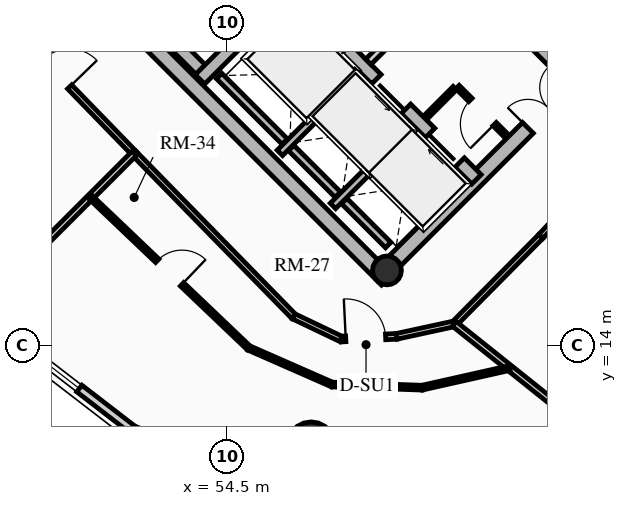
"""IFC4 building model, lengths in metres.
Left out: names, types, materials, properties, quantities, classifications, styles, units other than length and angle.
Written with IfcOpenShell. Run it as: python <this file> out.ifc"""

import sys

from ifc_helpers import new_model, si_unit, direction, frame, frame_2d, origin, origin_2d, place, context, subcontext, project, spatial, rectangle, circle, hollow_circle, extrude, source, transform, mapped, element, fill, save


model = new_model("IFC4")
c1 = context("Model", 3, precision=1e-05, world=origin(), true_north=direction((0.0, 1.0)))
c2 = subcontext(c1, "Body", "Model", "MODEL_VIEW")
j1 = project(units=[si_unit("LENGTHUNIT", "METRE"), si_unit("PLANEANGLEUNIT", "RADIAN")], contexts=[c1])
p1 = place(None, origin())
s1 = spatial("IfcSite", under=j1, at=p1, CompositionType="ELEMENT")
p2 = place(p1, origin())
s2 = spatial("IfcBuilding", under=s1, at=p2, CompositionType="ELEMENT")
p3 = place(p2, frame((0.0, 0.0, 174.88)))
s3 = spatial("IfcBuildingStorey", under=s2, at=p3, CompositionType="ELEMENT", Elevation=174.88)
p4 = place(p3, frame((58.702, 15.732, 0.0), z_axis=(0.0, 0.0, 1.0), x_axis=(-0.707106781187, 0.707106781187, 0.0)))
e1 = element("IfcWall", 1, at=p4, inside=s3, PredefinedType="SHEAR", context=c2, shape_type="SweptSolid", body=[
    extrude(rectangle(XDim=14.1, YDim=0.4, at=frame_2d((7.05, 0.0))), origin(), (0.0, 0.0, 1.0), 2.91),
])
p5 = place(p3, frame((58.561, 15.873, 0.0), z_axis=(0.0, 0.0, 1.0), x_axis=(0.707106781187, 0.707106781187, 0.0)))
e2 = element("IfcWall", 2, at=p5, inside=s3, PredefinedType="SHEAR", context=c2, shape_type="SweptSolid", body=[
    extrude(rectangle(XDim=10.7, YDim=0.4, at=frame_2d((5.35, 0.0))), origin(), (0.0, 0.0, 1.0), 2.91),
])
m1 = source(origin(), c2, "Body", "SweptSolid", [
    extrude(rectangle(XDim=1.5, YDim=2.02, at=frame_2d((0.75, 1.01))), frame((0.0, 0.21, 0.0), z_axis=(0.0, -1.0, 0.0), x_axis=(1.0, 0.0, 0.0)), (0.0, 0.0, 1.0), 0.42),
])
p6 = place(p5, frame((5.45, 0.0, 0.0)))
e3 = element("IfcOpeningElement", 3, at=p6, cuts=e2, PredefinedType="OPENING", context=c2, shape_type="MappedRepresentation", body=[
    mapped(m1, transform((0.0, 0.0, 0.0), x_axis=(1.0, 0.0, 0.0), y_axis=(0.0, 1.0, 0.0), z_axis=(0.0, 0.0, 1.0), scale=1.0)),
])
p7 = place(p3, frame((61.06, 18.373, 0.0), z_axis=(0.0, 0.0, 1.0), x_axis=(-0.707106781187, 0.707106781187, 0.0)))
e4 = element("IfcWall", 4, at=p7, inside=s3, PredefinedType="SHEAR", context=c2, shape_type="SweptSolid", body=[
    extrude(rectangle(XDim=13.7, YDim=0.35, at=frame_2d((6.85, 0.0))), origin(), (0.0, 0.0, 1.0), 2.91),
])
m2 = source(origin(), c2, "Body", "SweptSolid", [
    extrude(rectangle(XDim=1.1, YDim=2.015, at=frame_2d((0.55, 1.007))), frame((0.0, 0.185, 0.0), z_axis=(0.0, -1.0, 0.0), x_axis=(1.0, 0.0, 0.0)), (0.0, 0.0, 1.0), 0.37),
])
p8 = place(p7, frame((4.85, 0.0, 0.0)))
e5 = element("IfcOpeningElement", 5, at=p8, cuts=e4, PredefinedType="OPENING", context=c2, shape_type="MappedRepresentation", body=[
    mapped(m2, transform((0.0, 0.0, 0.0), x_axis=(1.0, 0.0, 0.0), y_axis=(0.0, 1.0, 0.0), z_axis=(0.0, 0.0, 1.0), scale=1.0)),
])
p9 = place(p7, frame((0.625, 0.0, 0.0)))
e6 = element("IfcOpeningElement", 6, at=p9, cuts=e4, PredefinedType="OPENING", context=c2, shape_type="MappedRepresentation", body=[
    mapped(m2, transform((0.0, 0.0, 0.0), x_axis=(1.0, 0.0, 0.0), y_axis=(0.0, 1.0, 0.0), z_axis=(0.0, 0.0, 1.0), scale=1.0)),
])
p10 = place(p7, frame((2.625, 0.0, 0.0)))
e7 = element("IfcOpeningElement", 7, at=p10, cuts=e4, PredefinedType="OPENING", context=c2, shape_type="MappedRepresentation", body=[
    mapped(m2, transform((0.0, 0.0, 0.0), x_axis=(1.0, 0.0, 0.0), y_axis=(0.0, 1.0, 0.0), z_axis=(0.0, 0.0, 1.0), scale=1.0)),
])
m3 = source(origin(), c2, "Body", "SweptSolid", [
    extrude(rectangle(XDim=1.15, YDim=2.02, at=frame_2d((0.575, 1.01))), frame((0.0, 0.185, 0.0), z_axis=(0.0, -1.0, 0.0), x_axis=(1.0, 0.0, 0.0)), (0.0, 0.0, 1.0), 0.37),
])
p11 = place(p7, frame((7.27, 0.0, 0.0)))
e8 = element("IfcOpeningElement", 8, at=p11, cuts=e4, PredefinedType="OPENING", context=c2, shape_type="MappedRepresentation", body=[
    mapped(m3, transform((0.0, 0.0, 0.0), x_axis=(1.0, 0.0, 0.0), y_axis=(0.0, 1.0, 0.0), z_axis=(0.0, 0.0, 1.0), scale=1.0)),
])
p12 = place(p3, frame((63.627, 20.94, 0.0), z_axis=(0.0, 0.0, 1.0), x_axis=(-0.707119496762, 0.707094065383, 0.0)))
e9 = element("IfcWall", 9, at=p12, inside=s3, PredefinedType="SHEAR", context=c2, shape_type="SweptSolid", body=[
    extrude(rectangle(XDim=9.6, YDim=0.35, at=frame_2d((4.8, 0.0))), origin(), (0.0, 0.0, 1.0), 2.91),
])
p13 = place(p12, frame((5.28, 0.0, 0.0)))
e10 = element("IfcOpeningElement", 10, at=p13, cuts=e9, PredefinedType="OPENING", context=c2, shape_type="MappedRepresentation", body=[
    mapped(m3, transform((0.0, 0.0, 0.0), x_axis=(1.0, 0.0, 0.0), y_axis=(0.0, 1.0, 0.0), z_axis=(0.0, 0.0, 1.0), scale=1.0)),
])
p14 = place(p3, frame((53.922, 21.141, 0.0), z_axis=(0.0, 0.0, 1.0), x_axis=(-0.707106781187, 0.707106781187, 0.0)))
e11 = element("IfcWall", 11, at=p14, inside=s3, PredefinedType="SHEAR", context=c2, shape_type="SweptSolid", body=[
    extrude(rectangle(XDim=6.695, YDim=0.35, at=frame_2d((3.348, 0.0))), origin(), (0.0, 0.0, 1.0), 2.91),
])
p15 = place(p3, frame((53.784, 21.003, 0.0), z_axis=(0.0, 0.0, 1.0), x_axis=(0.707106781187, 0.707106781187, 0.0)))
e12 = element("IfcWall", 12, at=p15, inside=s3, PredefinedType="SHEAR", context=c2, shape_type="SweptSolid", body=[
    extrude(rectangle(XDim=3.285, YDim=0.35, at=frame_2d((1.643, 0.0))), origin(), (0.0, 0.0, 1.0), 2.91),
])
p16 = place(p3, frame((58.706, 15.976, 0.0), z_axis=(0.0, 0.0, 1.0), x_axis=(0.707106781187, 0.707106781187, 0.0)))
e13 = element("IfcColumn", 13, at=p16, inside=s3, PredefinedType="COLUMN", context=c2, shape_type="SweptSolid", body=[
    extrude(hollow_circle(Radius=0.38, WallThickness=0.032, at=origin_2d()), origin(), (0.0, 0.0, 1.0), 2.91),
])
p17 = place(p3, frame((56.709, 11.365, 0.0), z_axis=(0.0, 0.0, 1.0), x_axis=(1.0, 0.0, 0.0)))
e14 = element("IfcColumn", 14, at=p17, inside=s3, PredefinedType="USERDEFINED", context=c2, shape_type="SweptSolid", body=[
    extrude(circle(Radius=0.625, at=origin_2d()), origin(), (0.0, 0.0, 1.0), 2.91),
])
p18 = place(p3, frame((52.021, 11.78, 0.0), z_axis=(0.0, 0.0, 1.0), x_axis=(-0.791962560189, 0.610569654715, 0.0)))
e15 = element("IfcWall", 15, at=p18, inside=s3, PredefinedType="SOLIDWALL", context=c2, shape_type="SweptSolid", body=[
    extrude(rectangle(XDim=5.163, YDim=0.22, at=frame_2d((2.582, 0.0))), origin(), (0.0, 0.0, 1.0), 2.245),
])
m4 = source(origin(), c2, "Body", "SweptSolid", [
    extrude(rectangle(XDim=1.6, YDim=1.3, at=frame_2d((0.8, 0.65))), frame((0.0, 0.12, 0.0), z_axis=(0.0, -1.0, 0.0), x_axis=(1.0, 0.0, 0.0)), (0.0, 0.0, 1.0), 0.24),
])
p19 = place(p18, frame((1.782, 0.0, 0.65)))
e16 = element("IfcOpeningElement", 16, at=p19, cuts=e15, PredefinedType="OPENING", context=c2, shape_type="MappedRepresentation", body=[
    mapped(m4, transform((0.0, 0.0, 0.0), x_axis=(1.0, 0.0, 0.0), y_axis=(0.0, 1.0, 0.0), z_axis=(0.0, 0.0, 1.0), scale=1.0)),
])
p20 = place(p3, frame((55.888, 19.069, 0.0), z_axis=(0.0, 0.0, 1.0), x_axis=(0.707106781187, 0.707106781187, 0.0)))
e17 = element("IfcWall", 17, at=p20, inside=s3, PredefinedType="SHEAR", context=c2, shape_type="SweptSolid", body=[
    extrude(rectangle(XDim=2.97, YDim=0.2, at=frame_2d((1.485, 0.0))), origin(), (0.0, 0.0, 1.0), 2.91),
])
p21 = place(p3, frame((56.015, 19.366, 0.0), z_axis=(0.0, 0.0, 1.0), x_axis=(-0.707106781187, 0.707106781187, 0.0)))
e18 = element("IfcWall", 18, at=p21, inside=s3, PredefinedType="SHEAR", context=c2, shape_type="SweptSolid", body=[
    extrude(rectangle(XDim=2.44, YDim=0.2, at=frame_2d((1.22, 0.0))), origin(), (0.0, 0.0, 1.0), 2.91),
])
p22 = place(p3, frame((57.284, 17.673, 0.0), z_axis=(0.0, 0.0, 1.0), x_axis=(0.707147878904, 0.70706568108, 0.0)))
e19 = element("IfcWall", 19, at=p22, inside=s3, PredefinedType="SHEAR", context=c2, shape_type="SweptSolid", body=[
    extrude(rectangle(XDim=2.97, YDim=0.2, at=frame_2d((1.485, 0.0))), origin(), (0.0, 0.0, 1.0), 2.91),
])
p23 = place(p3, frame((57.412, 17.97, 0.0), z_axis=(0.0, 0.0, 1.0), x_axis=(-0.707106781187, 0.707106781187, 0.0)))
e20 = element("IfcWall", 20, at=p23, inside=s3, PredefinedType="SHEAR", context=c2, shape_type="SweptSolid", body=[
    extrude(rectangle(XDim=1.735, YDim=0.2, at=frame_2d((0.867, 0.0))), origin(), (0.0, 0.0, 1.0), 2.91),
])
p24 = place(p3, frame((58.737, 16.644, 0.0), z_axis=(0.0, 0.0, 1.0), x_axis=(-0.707032117043, 0.707181437447, 0.0)))
e21 = element("IfcWall", 21, at=p24, inside=s3, PredefinedType="SHEAR", context=c2, shape_type="SweptSolid", body=[
    extrude(rectangle(XDim=1.635, YDim=0.2, at=frame_2d((0.817, 0.0))), origin(), (0.0, 0.0, 1.0), 2.91),
])
p25 = place(p3, frame((58.214, 21.467, 0.0), z_axis=(0.0, 0.0, 1.0), x_axis=(0.707106781187, 0.707106781187, 0.0)))
e22 = element("IfcWall", 22, at=p25, inside=s3, PredefinedType="PARTITIONING", context=c2, shape_type="SweptSolid", body=[
    extrude(rectangle(XDim=3.28, YDim=0.2, at=frame_2d((1.64, 0.0))), origin(), (0.0, 0.0, 1.0), 2.675),
])
m5 = source(origin(), c2, "Body", "SweptSolid", [
    extrude(rectangle(XDim=1.5, YDim=2.02, at=frame_2d((0.75, 1.01))), frame((0.0, 0.11, 0.0), z_axis=(0.0, -1.0, 0.0), x_axis=(1.0, 0.0, 0.0)), (0.0, 0.0, 1.0), 0.22),
])
p26 = place(p25, frame((1.55, 0.0, 0.0)))
e23 = element("IfcOpeningElement", 23, at=p26, cuts=e22, PredefinedType="OPENING", context=c2, shape_type="MappedRepresentation", body=[
    mapped(m5, transform((0.0, 0.0, 0.0), x_axis=(1.0, 0.0, 0.0), y_axis=(0.0, 1.0, 0.0), z_axis=(0.0, 0.0, 1.0), scale=1.0)),
])
p27 = place(p3, frame((61.835, 19.529, 0.0), z_axis=(0.0, 0.0, 1.0), x_axis=(-0.707174592913, 0.707038962956, 0.0)))
e24 = element("IfcWall", 24, at=p27, inside=s3, PredefinedType="PARTITIONING", context=c2, shape_type="SweptSolid", body=[
    extrude(rectangle(XDim=1.8, YDim=0.125, at=frame_2d((0.9, 0.0))), origin(), (0.0, 0.0, 1.0), 2.675),
])
m6 = source(origin(), c2, "Body", "SweptSolid", [
    extrude(rectangle(XDim=0.9, YDim=2.005, at=frame_2d((0.45, 1.002))), frame((0.0, 0.073, 0.0), z_axis=(0.0, -1.0, 0.0), x_axis=(1.0, 0.0, 0.0)), (0.0, 0.0, 1.0), 0.145),
])
p28 = place(p27, frame((0.42, 0.0, 0.0)))
e25 = element("IfcOpeningElement", 25, at=p28, cuts=e24, PredefinedType="OPENING", context=c2, shape_type="MappedRepresentation", body=[
    mapped(m6, transform((0.0, 0.0, 0.0), x_axis=(1.0, 0.0, 0.0), y_axis=(0.0, 1.0, 0.0), z_axis=(0.0, 0.0, 1.0), scale=1.0)),
])
p29 = place(p3, frame((59.713, 19.996, 0.0), z_axis=(0.0, 0.0, 1.0), x_axis=(0.707217726, 0.706995818963, 0.0)))
e26 = element("IfcWall", 26, at=p29, inside=s3, PredefinedType="PARTITIONING", context=c2, shape_type="SweptSolid", body=[
    extrude(rectangle(XDim=1.1, YDim=0.125, at=frame_2d((0.55, 0.0))), origin(), (0.0, 0.0, 1.0), 2.675),
])
p30 = place(p3, frame((47.959, 23.277, 0.0), z_axis=(0.0, 0.0, 1.0), x_axis=(0.696422573496, -0.717631938479, 0.0)))
e27 = element("IfcWall", 27, at=p30, inside=s3, PredefinedType="PARTITIONING", context=c2, shape_type="SweptSolid", body=[
    extrude(rectangle(XDim=5.882, YDim=0.15, at=frame_2d((2.941, 0.0))), origin(), (0.0, 0.0, 1.0), 2.675),
])
m7 = source(origin(), c2, "Body", "SweptSolid", [
    extrude(rectangle(XDim=1.0, YDim=2.015, at=frame_2d((0.5, 1.007))), frame((0.0, 0.085, 0.0), z_axis=(0.0, -1.0, 0.0), x_axis=(1.0, 0.0, 0.0)), (0.0, 0.0, 1.0), 0.17),
])
p31 = place(p30, frame((2.441, 0.0, 0.0)))
e28 = element("IfcOpeningElement", 28, at=p31, cuts=e27, PredefinedType="OPENING", context=c2, shape_type="MappedRepresentation", body=[
    mapped(m7, transform((0.0, 0.0, 0.0), x_axis=(1.0, 0.0, 0.0), y_axis=(0.0, 1.0, 0.0), z_axis=(0.0, 0.0, 1.0), scale=1.0)),
])
p32 = place(p3, frame((52.055, 19.055, 0.0), z_axis=(0.0, 0.0, 1.0), x_axis=(0.699249850691, -0.714877364524, 0.0)))
e29 = element("IfcWall", 29, at=p32, inside=s3, PredefinedType="PARTITIONING", context=c2, shape_type="SweptSolid", body=[
    extrude(rectangle(XDim=5.999, YDim=0.15, at=frame_2d((3.0, 0.0))), origin(), (0.0, 0.0, 1.0), 2.245),
])
p33 = place(p3, frame((56.25, 14.767, 0.0), z_axis=(0.0, 0.0, 1.0), x_axis=(0.902518380752, -0.430651335078, 0.0)))
e30 = element("IfcWall", 30, at=p33, inside=s3, PredefinedType="PARTITIONING", context=c2, shape_type="SweptSolid", body=[
    extrude(rectangle(XDim=1.386, YDim=0.15, at=frame_2d((0.693, 0.0))), origin(), (0.0, 0.0, 1.0), 2.245),
])
p34 = place(p3, frame((57.501, 14.17, 0.0), z_axis=(0.0, 0.0, 1.0), x_axis=(0.998814137693, 0.048685915254, 0.0)))
e31 = element("IfcWall", 31, at=p34, inside=s3, PredefinedType="PARTITIONING", context=c2, shape_type="SweptSolid", body=[
    extrude(rectangle(XDim=1.459, YDim=0.15, at=frame_2d((0.729, 0.0))), origin(), (0.0, 0.0, 1.0), 2.245),
])
m8 = source(origin(), c2, "Body", "SweptSolid", [
    extrude(rectangle(XDim=1.05, YDim=2.015, at=frame_2d((0.525, 1.007))), frame((0.0, 0.085, 0.0), z_axis=(0.0, -1.0, 0.0), x_axis=(1.0, 0.0, 0.0)), (0.0, 0.0, 1.0), 0.17),
])
p35 = place(p34, frame((0.12, 0.0, 0.0)))
e32 = element("IfcOpeningElement", 32, at=p35, cuts=e31, PredefinedType="OPENING", context=c2, shape_type="MappedRepresentation", body=[
    mapped(m8, transform((0.0, 0.0, 0.0), x_axis=(1.0, 0.0, 0.0), y_axis=(0.0, 1.0, 0.0), z_axis=(0.0, 0.0, 1.0), scale=1.0)),
])
p36 = place(p3, frame((58.959, 14.241, 0.0), z_axis=(0.0, 0.0, 1.0), x_axis=(0.977216106897, 0.212246744196, 0.0)))
e33 = element("IfcWall", 33, at=p36, inside=s3, PredefinedType="PARTITIONING", context=c2, shape_type="SweptSolid", body=[
    extrude(rectangle(XDim=1.552, YDim=0.15, at=frame_2d((0.776, 0.0))), origin(), (0.0, 0.0, 1.0), 2.245),
])
p37 = place(p3, frame((60.475, 14.57, 0.0), z_axis=(0.0, 0.0, 1.0), x_axis=(0.703709284374, 0.710488031628, 0.0)))
e34 = element("IfcWall", 34, at=p37, inside=s3, PredefinedType="PARTITIONING", context=c2, shape_type="SweptSolid", body=[
    extrude(rectangle(XDim=3.241, YDim=0.15, at=frame_2d((1.621, 0.0))), origin(), (0.0, 0.0, 1.0), 2.245),
])
p38 = place(p3, frame((62.756, 16.873, 0.0), z_axis=(0.0, 0.0, 1.0), x_axis=(0.682136885079, 0.73122450042, 0.0)))
e35 = element("IfcWall", 35, at=p38, inside=s3, PredefinedType="PARTITIONING", context=c2, shape_type="SweptSolid", body=[
    extrude(rectangle(XDim=6.476, YDim=0.15, at=frame_2d((3.238, 0.0))), origin(), (0.0, 0.0, 1.0), 2.245),
])
p39 = place(p38, frame((2.713, 0.0, 0.0)))
e36 = element("IfcOpeningElement", 36, at=p39, cuts=e35, PredefinedType="OPENING", context=c2, shape_type="MappedRepresentation", body=[
    mapped(m8, transform((0.0, 0.0, 0.0), x_axis=(1.0, 0.0, 0.0), y_axis=(0.0, 1.0, 0.0), z_axis=(0.0, 0.0, 1.0), scale=1.0)),
])
p40 = place(p3, frame((52.055, 19.055, 0.0), z_axis=(0.0, 0.0, 1.0), x_axis=(-0.707106781187, -0.707106781187, 0.0)))
e37 = element("IfcWall", 37, at=p40, inside=s3, PredefinedType="PARTITIONING", context=c2, shape_type="SweptSolid", body=[
    extrude(rectangle(XDim=5.811, YDim=0.16, at=frame_2d((2.906, 0.0))), origin(), (0.0, 0.0, 1.0), 2.245),
])
p41 = place(p3, frame((60.475, 14.57, 0.0), z_axis=(0.0, 0.0, 1.0), x_axis=(0.78156967059, -0.623817962241, 0.0)))
e38 = element("IfcWall", 38, at=p41, inside=s3, PredefinedType="PARTITIONING", context=c2, shape_type="SweptSolid", body=[
    extrude(rectangle(XDim=6.656, YDim=0.16, at=frame_2d((3.328, 0.0))), origin(), (0.0, 0.0, 1.0), 2.245),
])
p42 = place(p3, frame((50.905, 17.905, 0.0), z_axis=(0.0, 0.0, 1.0), x_axis=(0.723816902075, -0.689992095803, 0.0)))
e39 = element("IfcWall", 39, at=p42, inside=s3, PredefinedType="PARTITIONING", context=c2, shape_type="SweptSolid", body=[
    extrude(rectangle(XDim=5.753, YDim=0.125, at=frame_2d((2.876, 0.0))), origin(), (0.0, 0.0, 1.0), 2.245),
])
p43 = place(p42, frame((2.426, 0.0, 0.0)))
e40 = element("IfcOpeningElement", 40, at=p43, cuts=e39, PredefinedType="OPENING", context=c2, shape_type="MappedRepresentation", body=[
    mapped(m6, transform((0.0, 0.0, 0.0), x_axis=(1.0, 0.0, 0.0), y_axis=(0.0, 1.0, 0.0), z_axis=(0.0, 0.0, 1.0), scale=1.0)),
])
p44 = place(p3, frame((55.069, 13.936, 0.0), z_axis=(0.0, 0.0, 1.0), x_axis=(0.915625735972, -0.402031729626, 0.0)))
e41 = element("IfcWall", 41, at=p44, inside=s3, PredefinedType="PARTITIONING", context=c2, shape_type="SweptSolid", body=[
    extrude(rectangle(XDim=2.396, YDim=0.125, at=frame_2d((1.198, 0.0))), origin(), (0.0, 0.0, 1.0), 2.245),
])
p45 = place(p3, frame((57.263, 12.972, 0.0), z_axis=(0.0, 0.0, 1.0), x_axis=(0.999399614086, -0.034646953192, 0.0)))
e42 = element("IfcWall", 42, at=p45, inside=s3, PredefinedType="PARTITIONING", context=c2, shape_type="SweptSolid", body=[
    extrude(rectangle(XDim=2.368, YDim=0.125, at=frame_2d((1.184, 0.0))), origin(), (0.0, 0.0, 1.0), 2.245),
])
p46 = place(p3, frame((59.629, 12.89, 0.0), z_axis=(0.0, 0.0, 1.0), x_axis=(0.97566344203, 0.219273454585, 0.0)))
e43 = element("IfcWall", 43, at=p46, inside=s3, PredefinedType="PARTITIONING", context=c2, shape_type="SweptSolid", body=[
    extrude(rectangle(XDim=2.36, YDim=0.125, at=frame_2d((1.18, 0.0))), origin(), (0.0, 0.0, 1.0), 2.245),
])
m9 = source(origin(), c2, "Body", "SweptSolid", [
    extrude(rectangle(XDim=1.6, YDim=1.3, at=frame_2d((0.8, 0.65))), frame((0.0, 0.03, 0.0), z_axis=(0.0, -1.0, 0.0), x_axis=(1.0, 0.0, 0.0)), (0.0, 0.0, 1.0), 0.06),
])
p47 = place(p19, origin())
e44 = element("IfcWindow", 44, at=p47, inside=s3, PartitioningType="SINGLE_PANEL", PredefinedType="WINDOW", context=c2, shape_type="MappedRepresentation", body=[
    mapped(m9, transform((0.0, 0.0, 0.0), x_axis=(1.0, 0.0, 0.0), y_axis=(0.0, 1.0, 0.0), z_axis=(0.0, 0.0, 1.0), scale=1.0)),
])
fill(e16, e44)
m10 = source(origin(), c2, "Body", "SweptSolid", [
    extrude(rectangle(XDim=1.1, YDim=2.015, at=frame_2d((0.55, 1.007))), frame((0.0, 0.025, 0.0), z_axis=(0.0, -1.0, 0.0), x_axis=(1.0, 0.0, 0.0)), (0.0, 0.0, 1.0), 0.05),
])
p48 = place(p9, origin())
e45 = element("IfcDoor", 45, at=p48, inside=s3, OperationType="SLIDING_TO_RIGHT", PredefinedType="DOOR", context=c2, shape_type="MappedRepresentation", body=[
    mapped(m10, transform((0.0, 0.0, 0.0), x_axis=(1.0, 0.0, 0.0), y_axis=(0.0, 1.0, 0.0), z_axis=(0.0, 0.0, 1.0), scale=1.0)),
])
fill(e6, e45)
p49 = place(p10, origin())
e46 = element("IfcDoor", 46, at=p49, inside=s3, OperationType="SLIDING_TO_LEFT", PredefinedType="DOOR", context=c2, shape_type="MappedRepresentation", body=[
    mapped(m10, transform((0.0, 0.0, 0.0), x_axis=(1.0, 0.0, 0.0), y_axis=(0.0, 1.0, 0.0), z_axis=(0.0, 0.0, 1.0), scale=1.0)),
])
fill(e7, e46)
m11 = source(origin(), c2, "Body", "SweptSolid", [
    extrude(rectangle(XDim=1.5, YDim=2.02, at=frame_2d((0.75, 1.01))), frame((0.0, 0.025, 0.0), z_axis=(0.0, -1.0, 0.0), x_axis=(1.0, 0.0, 0.0)), (0.0, 0.0, 1.0), 0.05),
])
p50 = place(p6, origin())
e47 = element("IfcDoor", 47, at=p50, inside=s3, OperationType="DOUBLE_DOOR_SINGLE_SWING", PredefinedType="DOOR", context=c2, shape_type="MappedRepresentation", body=[
    mapped(m11, transform((0.0, 0.0, 0.0), x_axis=(1.0, 0.0, 0.0), y_axis=(0.0, 1.0, 0.0), z_axis=(0.0, 0.0, 1.0), scale=1.0)),
])
fill(e3, e47)
m12 = source(origin(), c2, "Body", "SweptSolid", [
    extrude(rectangle(XDim=0.9, YDim=2.005, at=frame_2d((0.45, 1.002))), frame((0.0, 0.025, 0.0), z_axis=(0.0, -1.0, 0.0), x_axis=(1.0, 0.0, 0.0)), (0.0, 0.0, 1.0), 0.05),
])
p51 = place(p28, origin())
e48 = element("IfcDoor", 48, at=p51, inside=s3, OperationType="SINGLE_SWING_LEFT", PredefinedType="DOOR", context=c2, shape_type="MappedRepresentation", body=[
    mapped(m12, transform((0.0, 0.0, 0.0), x_axis=(1.0, 0.0, 0.0), y_axis=(0.0, 1.0, 0.0), z_axis=(0.0, 0.0, 1.0), scale=1.0)),
])
fill(e25, e48)
m13 = source(origin(), c2, "Body", "SweptSolid", [
    extrude(rectangle(XDim=1.0, YDim=2.015, at=frame_2d((0.5, 1.007))), frame((0.0, 0.025, 0.0), z_axis=(0.0, -1.0, 0.0), x_axis=(1.0, 0.0, 0.0)), (0.0, 0.0, 1.0), 0.05),
])
p52 = place(p31, origin())
e49 = element("IfcDoor", 49, at=p52, inside=s3, OperationType="SINGLE_SWING_RIGHT", PredefinedType="DOOR", context=c2, shape_type="MappedRepresentation", body=[
    mapped(m13, transform((0.0, 0.0, 0.0), x_axis=(1.0, 0.0, 0.0), y_axis=(0.0, 1.0, 0.0), z_axis=(0.0, 0.0, 1.0), scale=1.0)),
])
fill(e28, e49)
m14 = source(origin(), c2, "Body", "SweptSolid", [
    extrude(rectangle(XDim=1.05, YDim=2.015, at=frame_2d((0.525, 1.007))), frame((0.0, 0.025, 0.0), z_axis=(0.0, -1.0, 0.0), x_axis=(1.0, 0.0, 0.0)), (0.0, 0.0, 1.0), 0.05),
])
p53 = place(p35, origin())
e50 = element("IfcDoor", 50, at=p53, inside=s3, OperationType="SINGLE_SWING_LEFT", PredefinedType="DOOR", context=c2, shape_type="MappedRepresentation", body=[
    mapped(m14, transform((0.0, 0.0, 0.0), x_axis=(1.0, 0.0, 0.0), y_axis=(0.0, 1.0, 0.0), z_axis=(0.0, 0.0, 1.0), scale=1.0)),
])
fill(e32, e50)
p54 = place(p43, origin())
e51 = element("IfcDoor", 51, at=p54, inside=s3, OperationType="SINGLE_SWING_RIGHT", PredefinedType="DOOR", context=c2, shape_type="MappedRepresentation", body=[
    mapped(m12, transform((0.0, 0.0, 0.0), x_axis=(1.0, 0.0, 0.0), y_axis=(0.0, 1.0, 0.0), z_axis=(0.0, 0.0, 1.0), scale=1.0)),
])
fill(e40, e51)
save(model, sys.argv[1])
